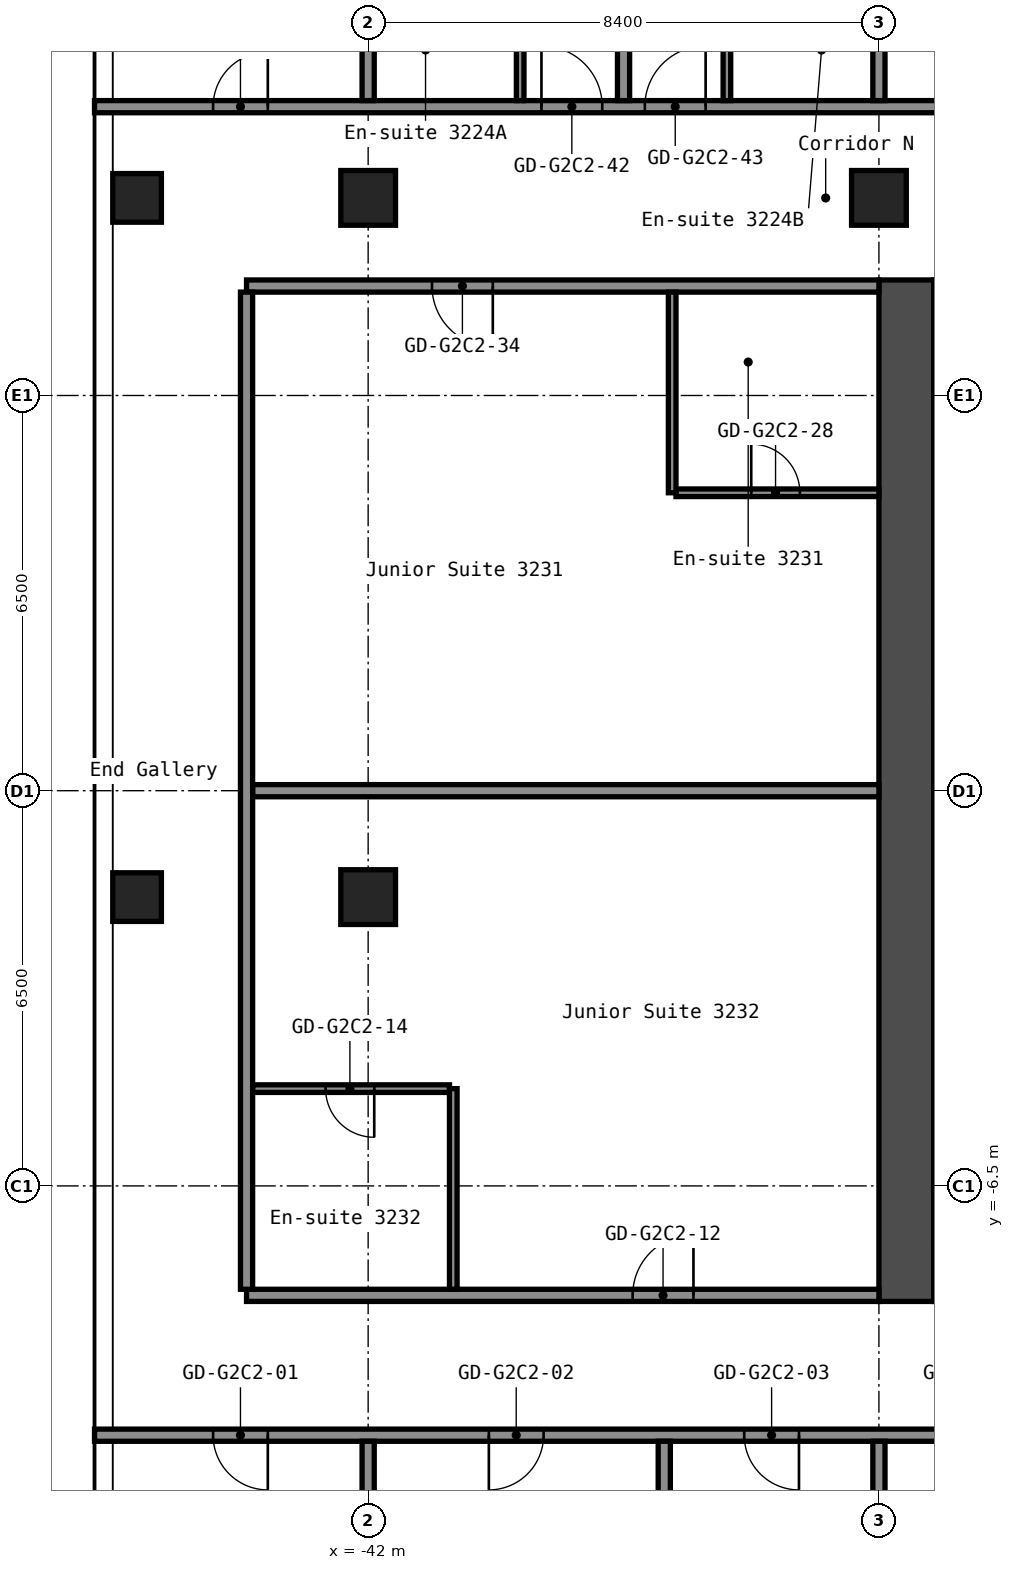
"""IFC4 building model, lengths in metres.
Left out: names, types, materials, properties, quantities, classifications, styles, units other than length and angle.
Written with IfcOpenShell. Run it as: python <this file> out.ifc"""

import sys

from ifc_helpers import new_model, si_unit, direction, frame, frame_2d, origin, origin_2d, place, context, subcontext, project, spatial, rectangle, hollow_rectangle, extrude, element, fill, save


model = new_model("IFC4")
c1 = context("Model", 3, precision=1e-05, world=origin(), true_north=direction((0.0, 1.0)))
c2 = subcontext(c1, "Body", "Model", "MODEL_VIEW")
j1 = project(units=[si_unit("LENGTHUNIT", "METRE"), si_unit("PLANEANGLEUNIT", "RADIAN")], contexts=[c1])
p1 = place(None, origin())
s1 = spatial("IfcSite", under=j1, at=p1, CompositionType="ELEMENT")
p2 = place(p1, origin())
s2 = spatial("IfcBuilding", under=s1, at=p2, CompositionType="ELEMENT")
p3 = place(p2, frame((0.0, 0.0, 113.8)))
s3 = spatial("IfcBuildingStorey", under=s2, at=p3, CompositionType="ELEMENT", Elevation=113.8)
for number, where, z_axis, x_axis in (
    (1, (-45.8, -1.75, 0.0), (0.0, 0.0, 1.0), (1.0, 0.0, 0.0)),
    (2, (-45.8, 9.75, 0.0), (0.0, 0.0, 1.0), (1.0, 0.0, 0.0)),
):
    element("IfcColumn", number, at=place(p3, frame(where, z_axis=z_axis, x_axis=x_axis)), inside=s3, PredefinedType="COLUMN", context=c2, shape_type="SweptSolid", body=[
        extrude(hollow_rectangle(XDim=0.8, YDim=0.8, WallThickness=0.032, at=origin_2d()), origin(), (0.0, 0.0, 1.0), 2.8),
    ])
for number, where, z_axis, x_axis in (
    (3, (-42.0, -1.75, 0.0), (0.0, 0.0, 1.0), (1.0, 0.0, 0.0)),
    (4, (-42.0, 9.75, 0.0), (0.0, 0.0, 1.0), (1.0, 0.0, 0.0)),
    (5, (-33.6, 9.75, 0.0), (0.0, 0.0, 1.0), (1.0, 0.0, 0.0)),
):
    element("IfcColumn", number, at=place(p3, frame(where, z_axis=z_axis, x_axis=x_axis)), inside=s3, PredefinedType="COLUMN", context=c2, shape_type="SweptSolid", body=[
        extrude(hollow_rectangle(XDim=0.9, YDim=0.9, WallThickness=0.036, at=origin_2d()), origin(), (0.0, 0.0, 1.0), 2.8),
    ])
p4 = place(p3, frame((-33.15, -8.4, 0.0), z_axis=(0.0, 0.0, 1.0), x_axis=(0.0, 1.0, 0.0)))
e6 = element("IfcWall", 6, at=p4, inside=s3, PredefinedType="SHEAR", context=c2, shape_type="SweptSolid", body=[
    extrude(rectangle(XDim=16.8, YDim=0.9, at=frame_2d((8.4, 0.0))), origin(), (0.0, 0.0, 1.0), 2.8),
])
p5 = place(p3, frame((-32.7, 1.325, 0.0), z_axis=(0.0, 0.0, 1.0), x_axis=(1.0, 0.0, 0.0)))
e7 = element("IfcWall", 7, at=p5, inside=s3, PredefinedType="SHEAR", context=c2, shape_type="SweptSolid", body=[
    extrude(rectangle(XDim=5.05, YDim=0.25, at=frame_2d((2.525, 0.0))), origin(), (0.0, 0.0, 1.0), 2.8),
])
p6 = place(p5, frame((3.3, 0.0, 0.0)))
e8 = element("IfcOpeningElement", 8, at=p6, cuts=e7, PredefinedType="OPENING", context=c2, shape_type="SweptSolid", body=[
    extrude(rectangle(XDim=1.2, YDim=2.1, at=frame_2d((0.6, 1.05))), frame((0.0, 0.135, 0.0), z_axis=(0.0, -1.0, 0.0), x_axis=(1.0, 0.0, 0.0)), (0.0, 0.0, 1.0), 0.27),
])
p7 = place(p3, frame((-32.7, -3.625, 0.0), z_axis=(0.0, 0.0, 1.0), x_axis=(1.0, 0.0, 0.0)))
e9 = element("IfcWall", 9, at=p7, inside=s3, PredefinedType="SHEAR", context=c2, shape_type="SweptSolid", body=[
    extrude(rectangle(XDim=4.55, YDim=0.25, at=frame_2d((2.275, 0.0))), origin(), (0.0, 0.0, 1.0), 2.8),
])
p8 = place(p7, frame((2.85, 0.0, 0.0)))
e10 = element("IfcOpeningElement", 10, at=p8, cuts=e9, PredefinedType="OPENING", context=c2, shape_type="SweptSolid", body=[
    extrude(rectangle(XDim=1.1, YDim=2.1, at=frame_2d((0.55, 1.05))), frame((0.0, 0.135, 0.0), z_axis=(0.0, -1.0, 0.0), x_axis=(1.0, 0.0, 0.0)), (0.0, 0.0, 1.0), 0.27),
])
p9 = place(p7, frame((0.6, 0.0, 0.0)))
e11 = element("IfcOpeningElement", 11, at=p9, cuts=e9, PredefinedType="OPENING", context=c2, shape_type="SweptSolid", body=[
    extrude(rectangle(XDim=1.1, YDim=2.1, at=frame_2d((0.55, 1.05))), frame((0.0, 0.135, 0.0), z_axis=(0.0, -1.0, 0.0), x_axis=(1.0, 0.0, 0.0)), (0.0, 0.0, 1.0), 0.27),
])
p10 = place(p3, frame((-32.7, -6.75, 0.0), z_axis=(0.0, 0.0, 1.0), x_axis=(1.0, 0.0, 0.0)))
e12 = element("IfcWall", 12, at=p10, inside=s3, PredefinedType="SHEAR", context=c2, shape_type="SweptSolid", body=[
    extrude(rectangle(XDim=4.55, YDim=1.5, at=frame_2d((2.275, 0.0))), origin(), (0.0, 0.0, 1.0), 2.8),
])
p11 = place(p3, frame((-32.7, -0.875, 0.0), z_axis=(0.0, 0.0, 1.0), x_axis=(1.0, 0.0, 0.0)))
e13 = element("IfcWall", 13, at=p11, inside=s3, PredefinedType="PARTITIONING", context=c2, shape_type="SweptSolid", body=[
    extrude(rectangle(XDim=2.3, YDim=0.15, at=frame_2d((1.15, 0.0))), origin(), (0.0, 0.0, 1.0), 2.8),
])
p12 = place(p3, frame((-46.5, -10.6, 0.0), z_axis=(0.0, 0.0, 1.0), x_axis=(1.0, 0.0, 0.0)))
e14 = element("IfcWall", 14, at=p12, inside=s3, PredefinedType="PARTITIONING", context=c2, shape_type="SweptSolid", body=[
    extrude(rectangle(XDim=29.7, YDim=0.2, at=frame_2d((14.85, 0.0))), origin(), (0.0, 0.0, 1.0), 2.8),
])
p13 = place(p12, frame((1.95, 0.0, 0.0)))
e15 = element("IfcOpeningElement", 15, at=p13, cuts=e14, PredefinedType="OPENING", context=c2, shape_type="SweptSolid", body=[
    extrude(rectangle(XDim=0.9, YDim=2.1, at=frame_2d((0.45, 1.05))), frame((0.0, 0.11, 0.0), z_axis=(0.0, -1.0, 0.0), x_axis=(1.0, 0.0, 0.0)), (0.0, 0.0, 1.0), 0.22),
])
p14 = place(p12, frame((6.485, 0.0, 0.0)))
e16 = element("IfcOpeningElement", 16, at=p14, cuts=e14, PredefinedType="OPENING", context=c2, shape_type="SweptSolid", body=[
    extrude(rectangle(XDim=0.9, YDim=2.1, at=frame_2d((0.45, 1.05))), frame((0.0, 0.11, 0.0), z_axis=(0.0, -1.0, 0.0), x_axis=(1.0, 0.0, 0.0)), (0.0, 0.0, 1.0), 0.22),
])
p15 = place(p12, frame((10.685, 0.0, 0.0)))
e17 = element("IfcOpeningElement", 17, at=p15, cuts=e14, PredefinedType="OPENING", context=c2, shape_type="SweptSolid", body=[
    extrude(rectangle(XDim=0.9, YDim=2.1, at=frame_2d((0.45, 1.05))), frame((0.0, 0.11, 0.0), z_axis=(0.0, -1.0, 0.0), x_axis=(1.0, 0.0, 0.0)), (0.0, 0.0, 1.0), 0.22),
])
p16 = place(p12, frame((14.13, 0.0, 0.0)))
e18 = element("IfcOpeningElement", 18, at=p16, cuts=e14, PredefinedType="OPENING", context=c2, shape_type="SweptSolid", body=[
    extrude(rectangle(XDim=0.9, YDim=2.1, at=frame_2d((0.45, 1.05))), frame((0.0, 0.11, 0.0), z_axis=(0.0, -1.0, 0.0), x_axis=(1.0, 0.0, 0.0)), (0.0, 0.0, 1.0), 0.22),
])
p17 = place(p12, frame((18.33, 0.0, 0.0)))
e19 = element("IfcOpeningElement", 19, at=p17, cuts=e14, PredefinedType="OPENING", context=c2, shape_type="SweptSolid", body=[
    extrude(rectangle(XDim=0.9, YDim=2.1, at=frame_2d((0.45, 1.05))), frame((0.0, 0.11, 0.0), z_axis=(0.0, -1.0, 0.0), x_axis=(1.0, 0.0, 0.0)), (0.0, 0.0, 1.0), 0.22),
])
p18 = place(p12, frame((25.0, 0.0, 0.0)))
e20 = element("IfcOpeningElement", 20, at=p18, cuts=e14, PredefinedType="OPENING", context=c2, shape_type="SweptSolid", body=[
    extrude(rectangle(XDim=1.0, YDim=2.1, at=frame_2d((0.5, 1.05))), frame((0.0, 0.11, 0.0), z_axis=(0.0, -1.0, 0.0), x_axis=(1.0, 0.0, 0.0)), (0.0, 0.0, 1.0), 0.22),
])
p19 = place(p3, frame((-44.0, -8.3, 0.0), z_axis=(0.0, 0.0, 1.0), x_axis=(1.0, 0.0, 0.0)))
e21 = element("IfcWall", 21, at=p19, inside=s3, PredefinedType="PARTITIONING", context=c2, shape_type="SweptSolid", body=[
    extrude(rectangle(XDim=10.4, YDim=0.2, at=frame_2d((5.2, 0.0))), origin(), (0.0, 0.0, 1.0), 2.8),
])
p20 = place(p19, frame((6.35, 0.0, 0.0)))
e22 = element("IfcOpeningElement", 22, at=p20, cuts=e21, PredefinedType="OPENING", context=c2, shape_type="SweptSolid", body=[
    extrude(rectangle(XDim=1.0, YDim=2.1, at=frame_2d((0.5, 1.05))), frame((0.0, 0.11, 0.0), z_axis=(0.0, -1.0, 0.0), x_axis=(1.0, 0.0, 0.0)), (0.0, 0.0, 1.0), 0.22),
])
p21 = place(p3, frame((-43.9, -4.9, 0.0), z_axis=(0.0, 0.0, 1.0), x_axis=(1.0, 0.0, 0.0)))
e23 = element("IfcWall", 23, at=p21, inside=s3, PredefinedType="PARTITIONING", context=c2, shape_type="SweptSolid", body=[
    extrude(rectangle(XDim=3.237, YDim=0.125, at=frame_2d((1.619, 0.0))), origin(), (0.0, 0.0, 1.0), 2.8),
])
p22 = place(p21, frame((1.2, 0.0, 0.0)))
e24 = element("IfcOpeningElement", 24, at=p22, cuts=e23, PredefinedType="OPENING", context=c2, shape_type="SweptSolid", body=[
    extrude(rectangle(XDim=0.8, YDim=2.1, at=frame_2d((0.4, 1.05))), frame((0.0, 0.073, 0.0), z_axis=(0.0, -1.0, 0.0), x_axis=(1.0, 0.0, 0.0)), (0.0, 0.0, 1.0), 0.145),
])
p23 = place(p3, frame((-43.9, 0.0, 0.0), z_axis=(0.0, 0.0, 1.0), x_axis=(1.0, 0.0, 0.0)))
e25 = element("IfcWall", 25, at=p23, inside=s3, PredefinedType="PARTITIONING", context=c2, shape_type="SweptSolid", body=[
    extrude(rectangle(XDim=10.3, YDim=0.2, at=frame_2d((5.15, 0.0))), origin(), (0.0, 0.0, 1.0), 2.8),
])
p24 = place(p3, frame((-36.938, 4.9, 0.0), z_axis=(0.0, 0.0, 1.0), x_axis=(1.0, 0.0, 0.0)))
e26 = element("IfcWall", 26, at=p24, inside=s3, PredefinedType="PARTITIONING", context=c2, shape_type="SweptSolid", body=[
    extrude(rectangle(XDim=3.337, YDim=0.125, at=frame_2d((1.669, 0.0))), origin(), (0.0, 0.0, 1.0), 2.8),
])
p25 = place(p24, frame((1.238, 0.0, 0.0)))
e27 = element("IfcOpeningElement", 27, at=p25, cuts=e26, PredefinedType="OPENING", context=c2, shape_type="SweptSolid", body=[
    extrude(rectangle(XDim=0.8, YDim=2.1, at=frame_2d((0.4, 1.05))), frame((0.0, 0.073, 0.0), z_axis=(0.0, -1.0, 0.0), x_axis=(1.0, 0.0, 0.0)), (0.0, 0.0, 1.0), 0.145),
])
p26 = place(p3, frame((-44.0, 8.3, 0.0), z_axis=(0.0, 0.0, 1.0), x_axis=(1.0, 0.0, 0.0)))
e28 = element("IfcWall", 28, at=p26, inside=s3, PredefinedType="PARTITIONING", context=c2, shape_type="SweptSolid", body=[
    extrude(rectangle(XDim=10.4, YDim=0.2, at=frame_2d((5.2, 0.0))), origin(), (0.0, 0.0, 1.0), 2.8),
])
p27 = place(p26, frame((3.05, 0.0, 0.0)))
e29 = element("IfcOpeningElement", 29, at=p27, cuts=e28, PredefinedType="OPENING", context=c2, shape_type="SweptSolid", body=[
    extrude(rectangle(XDim=1.0, YDim=2.1, at=frame_2d((0.5, 1.05))), frame((0.0, 0.11, 0.0), z_axis=(0.0, -1.0, 0.0), x_axis=(1.0, 0.0, 0.0)), (0.0, 0.0, 1.0), 0.22),
])
p28 = place(p3, frame((-46.5, 11.25, 0.0), z_axis=(0.0, 0.0, 1.0), x_axis=(1.0, 0.0, 0.0)))
e30 = element("IfcWall", 30, at=p28, inside=s3, PredefinedType="PARTITIONING", context=c2, shape_type="SweptSolid", body=[
    extrude(rectangle(XDim=29.7, YDim=0.2, at=frame_2d((14.85, 0.0))), origin(), (0.0, 0.0, 1.0), 2.8),
])
p29 = place(p28, frame((1.95, 0.0, 0.0)))
e31 = element("IfcOpeningElement", 31, at=p29, cuts=e30, PredefinedType="OPENING", context=c2, shape_type="SweptSolid", body=[
    extrude(rectangle(XDim=0.9, YDim=2.1, at=frame_2d((0.45, 1.05))), frame((0.0, 0.11, 0.0), z_axis=(0.0, -1.0, 0.0), x_axis=(1.0, 0.0, 0.0)), (0.0, 0.0, 1.0), 0.22),
])
p30 = place(p28, frame((7.35, 0.0, 0.0)))
e32 = element("IfcOpeningElement", 32, at=p30, cuts=e30, PredefinedType="OPENING", context=c2, shape_type="SweptSolid", body=[
    extrude(rectangle(XDim=1.0, YDim=2.1, at=frame_2d((0.5, 1.05))), frame((0.0, 0.11, 0.0), z_axis=(0.0, -1.0, 0.0), x_axis=(1.0, 0.0, 0.0)), (0.0, 0.0, 1.0), 0.22),
])
p31 = place(p28, frame((9.05, 0.0, 0.0)))
e33 = element("IfcOpeningElement", 33, at=p31, cuts=e30, PredefinedType="OPENING", context=c2, shape_type="SweptSolid", body=[
    extrude(rectangle(XDim=1.0, YDim=2.1, at=frame_2d((0.5, 1.05))), frame((0.0, 0.11, 0.0), z_axis=(0.0, -1.0, 0.0), x_axis=(1.0, 0.0, 0.0)), (0.0, 0.0, 1.0), 0.22),
])
p32 = place(p28, frame((18.3, 0.0, 0.0)))
e34 = element("IfcOpeningElement", 34, at=p32, cuts=e30, PredefinedType="OPENING", context=c2, shape_type="SweptSolid", body=[
    extrude(rectangle(XDim=1.0, YDim=2.1, at=frame_2d((0.5, 1.05))), frame((0.0, 0.11, 0.0), z_axis=(0.0, -1.0, 0.0), x_axis=(1.0, 0.0, 0.0)), (0.0, 0.0, 1.0), 0.22),
])
p33 = place(p28, frame((24.15, 0.0, 0.0)))
e35 = element("IfcOpeningElement", 35, at=p33, cuts=e30, PredefinedType="OPENING", context=c2, shape_type="SweptSolid", body=[
    extrude(rectangle(XDim=1.0, YDim=2.1, at=frame_2d((0.5, 1.05))), frame((0.0, 0.11, 0.0), z_axis=(0.0, -1.0, 0.0), x_axis=(1.0, 0.0, 0.0)), (0.0, 0.0, 1.0), 0.22),
])
p34 = place(p28, frame((25.85, 0.0, 0.0)))
e36 = element("IfcOpeningElement", 36, at=p34, cuts=e30, PredefinedType="OPENING", context=c2, shape_type="SweptSolid", body=[
    extrude(rectangle(XDim=1.0, YDim=2.1, at=frame_2d((0.5, 1.05))), frame((0.0, 0.11, 0.0), z_axis=(0.0, -1.0, 0.0), x_axis=(1.0, 0.0, 0.0)), (0.0, 0.0, 1.0), 0.22),
])
p35 = place(p3, frame((-44.0, -8.2, 0.0), z_axis=(0.0, 0.0, 1.0), x_axis=(0.0, 1.0, 0.0)))
e37 = element("IfcWall", 37, at=p35, inside=s3, PredefinedType="PARTITIONING", context=c2, shape_type="SweptSolid", body=[
    extrude(rectangle(XDim=16.4, YDim=0.2, at=frame_2d((8.2, 0.0))), origin(), (0.0, 0.0, 1.0), 2.8),
])
p36 = place(p3, frame((-42.0, -15.55, 0.0), z_axis=(0.0, 0.0, 1.0), x_axis=(0.0, 1.0, 0.0)))
e38 = element("IfcWall", 38, at=p36, inside=s3, PredefinedType="PARTITIONING", context=c2, shape_type="SweptSolid", body=[
    extrude(rectangle(XDim=4.85, YDim=0.2, at=frame_2d((2.425, 0.0))), origin(), (0.0, 0.0, 1.0), 2.8),
])
p37 = place(p3, frame((-42.0, 11.35, 0.0), z_axis=(0.0, 0.0, 1.0), x_axis=(0.0, 1.0, 0.0)))
e39 = element("IfcWall", 39, at=p37, inside=s3, PredefinedType="PARTITIONING", context=c2, shape_type="SweptSolid", body=[
    extrude(rectangle(XDim=12.2, YDim=0.2, at=frame_2d((6.1, 0.0))), origin(), (0.0, 0.0, 1.0), 2.8),
])
p38 = place(p3, frame((-40.6, -8.2, 0.0), z_axis=(0.0, 0.0, 1.0), x_axis=(0.0, 1.0, 0.0)))
e40 = element("IfcWall", 40, at=p38, inside=s3, PredefinedType="PARTITIONING", context=c2, shape_type="SweptSolid", body=[
    extrude(rectangle(XDim=3.3, YDim=0.125, at=frame_2d((1.65, 0.0))), origin(), (0.0, 0.0, 1.0), 2.8),
])
p39 = place(p3, frame((-39.5, 11.35, 0.0), z_axis=(0.0, 0.0, 1.0), x_axis=(0.0, 1.0, 0.0)))
e41 = element("IfcWall", 41, at=p39, inside=s3, PredefinedType="PARTITIONING", context=c2, shape_type="SweptSolid", body=[
    extrude(rectangle(XDim=2.9, YDim=0.125, at=frame_2d((1.45, 0.0))), origin(), (0.0, 0.0, 1.0), 2.8),
])
p40 = place(p39, frame((1.5, 0.0, 0.0)))
e42 = element("IfcOpeningElement", 42, at=p40, cuts=e41, PredefinedType="OPENING", context=c2, shape_type="SweptSolid", body=[
    extrude(rectangle(XDim=0.8, YDim=2.1, at=frame_2d((0.4, 1.05))), frame((0.0, 0.073, 0.0), z_axis=(0.0, -1.0, 0.0), x_axis=(1.0, 0.0, 0.0)), (0.0, 0.0, 1.0), 0.145),
])
p41 = place(p3, frame((-37.8, 11.35, 0.0), z_axis=(0.0, 0.0, 1.0), x_axis=(0.0, 1.0, 0.0)))
e43 = element("IfcWall", 43, at=p41, inside=s3, PredefinedType="PARTITIONING", context=c2, shape_type="SweptSolid", body=[
    extrude(rectangle(XDim=12.2, YDim=0.2, at=frame_2d((6.1, 0.0))), origin(), (0.0, 0.0, 1.0), 2.8),
])
p42 = place(p3, frame((-37.13, -15.55, 0.0), z_axis=(0.0, 0.0, 1.0), x_axis=(0.0, 1.0, 0.0)))
e44 = element("IfcWall", 44, at=p42, inside=s3, PredefinedType="PARTITIONING", context=c2, shape_type="SweptSolid", body=[
    extrude(rectangle(XDim=4.85, YDim=0.2, at=frame_2d((2.425, 0.0))), origin(), (0.0, 0.0, 1.0), 2.8),
])
p43 = place(p3, frame((-37.0, 4.9, 0.0), z_axis=(0.0, 0.0, 1.0), x_axis=(0.0, 1.0, 0.0)))
e45 = element("IfcWall", 45, at=p43, inside=s3, PredefinedType="PARTITIONING", context=c2, shape_type="SweptSolid", body=[
    extrude(rectangle(XDim=3.3, YDim=0.125, at=frame_2d((1.65, 0.0))), origin(), (0.0, 0.0, 1.0), 2.8),
])
p44 = place(p3, frame((-36.1, 11.35, 0.0), z_axis=(0.0, 0.0, 1.0), x_axis=(0.0, 1.0, 0.0)))
e46 = element("IfcWall", 46, at=p44, inside=s3, PredefinedType="PARTITIONING", context=c2, shape_type="SweptSolid", body=[
    extrude(rectangle(XDim=2.9, YDim=0.125, at=frame_2d((1.45, 0.0))), origin(), (0.0, 0.0, 1.0), 2.8),
])
p45 = place(p44, frame((1.5, 0.0, 0.0)))
e47 = element("IfcOpeningElement", 47, at=p45, cuts=e46, PredefinedType="OPENING", context=c2, shape_type="SweptSolid", body=[
    extrude(rectangle(XDim=0.8, YDim=2.1, at=frame_2d((0.4, 1.05))), frame((0.0, 0.073, 0.0), z_axis=(0.0, -1.0, 0.0), x_axis=(1.0, 0.0, 0.0)), (0.0, 0.0, 1.0), 0.145),
])
p46 = place(p3, frame((-33.6, -15.55, 0.0), z_axis=(0.0, 0.0, 1.0), x_axis=(0.0, 1.0, 0.0)))
e48 = element("IfcWall", 48, at=p46, inside=s3, PredefinedType="PARTITIONING", context=c2, shape_type="SweptSolid", body=[
    extrude(rectangle(XDim=4.85, YDim=0.2, at=frame_2d((2.425, 0.0))), origin(), (0.0, 0.0, 1.0), 2.8),
])
p47 = place(p3, frame((-33.6, 11.35, 0.0), z_axis=(0.0, 0.0, 1.0), x_axis=(0.0, 1.0, 0.0)))
e49 = element("IfcWall", 49, at=p47, inside=s3, PredefinedType="PARTITIONING", context=c2, shape_type="SweptSolid", body=[
    extrude(rectangle(XDim=12.2, YDim=0.2, at=frame_2d((6.1, 0.0))), origin(), (0.0, 0.0, 1.0), 2.8),
])
p48 = place(p13, origin())
e50 = element("IfcDoor", 50, at=p48, inside=s3, OperationType="SINGLE_SWING_RIGHT", PredefinedType="DOOR", context=c2, shape_type="SweptSolid", body=[
    extrude(rectangle(XDim=0.9, YDim=2.1, at=frame_2d((0.45, 1.05))), frame((0.0, 0.025, 0.0), z_axis=(0.0, -1.0, 0.0), x_axis=(1.0, 0.0, 0.0)), (0.0, 0.0, 1.0), 0.05),
])
fill(e15, e50)
p49 = place(p14, origin())
e51 = element("IfcDoor", 51, at=p49, inside=s3, OperationType="SINGLE_SWING_LEFT", PredefinedType="DOOR", context=c2, shape_type="SweptSolid", body=[
    extrude(rectangle(XDim=0.9, YDim=2.1, at=frame_2d((0.45, 1.05))), frame((0.0, 0.025, 0.0), z_axis=(0.0, -1.0, 0.0), x_axis=(1.0, 0.0, 0.0)), (0.0, 0.0, 1.0), 0.05),
])
fill(e16, e51)
p50 = place(p15, origin())
e52 = element("IfcDoor", 52, at=p50, inside=s3, OperationType="SINGLE_SWING_RIGHT", PredefinedType="DOOR", context=c2, shape_type="SweptSolid", body=[
    extrude(rectangle(XDim=0.9, YDim=2.1, at=frame_2d((0.45, 1.05))), frame((0.0, 0.025, 0.0), z_axis=(0.0, -1.0, 0.0), x_axis=(1.0, 0.0, 0.0)), (0.0, 0.0, 1.0), 0.05),
])
fill(e17, e52)
p51 = place(p20, origin())
e53 = element("IfcDoor", 53, at=p51, inside=s3, OperationType="SINGLE_SWING_LEFT", PredefinedType="DOOR", context=c2, shape_type="SweptSolid", body=[
    extrude(rectangle(XDim=1.0, YDim=2.1, at=frame_2d((0.5, 1.05))), frame((0.0, 0.025, 0.0), z_axis=(0.0, -1.0, 0.0), x_axis=(1.0, 0.0, 0.0)), (0.0, 0.0, 1.0), 0.05),
])
fill(e22, e53)
p52 = place(p22, origin())
e54 = element("IfcDoor", 54, at=p52, inside=s3, OperationType="SINGLE_SWING_RIGHT", PredefinedType="DOOR", context=c2, shape_type="SweptSolid", body=[
    extrude(rectangle(XDim=0.8, YDim=2.1, at=frame_2d((0.4, 1.05))), frame((0.0, 0.025, 0.0), z_axis=(0.0, -1.0, 0.0), x_axis=(1.0, 0.0, 0.0)), (0.0, 0.0, 1.0), 0.05),
])
fill(e24, e54)
p53 = place(p25, origin())
e55 = element("IfcDoor", 55, at=p53, inside=s3, OperationType="SINGLE_SWING_RIGHT", PredefinedType="DOOR", context=c2, shape_type="SweptSolid", body=[
    extrude(rectangle(XDim=0.8, YDim=2.1, at=frame_2d((0.4, 1.05))), frame((0.0, 0.025, 0.0), z_axis=(0.0, -1.0, 0.0), x_axis=(1.0, 0.0, 0.0)), (0.0, 0.0, 1.0), 0.05),
])
fill(e27, e55)
p54 = place(p27, origin())
e56 = element("IfcDoor", 56, at=p54, inside=s3, OperationType="SINGLE_SWING_RIGHT", PredefinedType="DOOR", context=c2, shape_type="SweptSolid", body=[
    extrude(rectangle(XDim=1.0, YDim=2.1, at=frame_2d((0.5, 1.05))), frame((0.0, 0.025, 0.0), z_axis=(0.0, -1.0, 0.0), x_axis=(1.0, 0.0, 0.0)), (0.0, 0.0, 1.0), 0.05),
])
fill(e29, e56)
p55 = place(p29, origin())
e57 = element("IfcDoor", 57, at=p55, inside=s3, OperationType="SINGLE_SWING_LEFT", PredefinedType="DOOR", context=c2, shape_type="SweptSolid", body=[
    extrude(rectangle(XDim=0.9, YDim=2.1, at=frame_2d((0.45, 1.05))), frame((0.0, 0.025, 0.0), z_axis=(0.0, -1.0, 0.0), x_axis=(1.0, 0.0, 0.0)), (0.0, 0.0, 1.0), 0.05),
])
fill(e31, e57)
p56 = place(p30, origin())
e58 = element("IfcDoor", 58, at=p56, inside=s3, OperationType="SINGLE_SWING_RIGHT", PredefinedType="DOOR", context=c2, shape_type="SweptSolid", body=[
    extrude(rectangle(XDim=1.0, YDim=2.1, at=frame_2d((0.5, 1.05))), frame((0.0, 0.025, 0.0), z_axis=(0.0, -1.0, 0.0), x_axis=(1.0, 0.0, 0.0)), (0.0, 0.0, 1.0), 0.05),
])
fill(e32, e58)
p57 = place(p31, origin())
e59 = element("IfcDoor", 59, at=p57, inside=s3, OperationType="SINGLE_SWING_LEFT", PredefinedType="DOOR", context=c2, shape_type="SweptSolid", body=[
    extrude(rectangle(XDim=1.0, YDim=2.1, at=frame_2d((0.5, 1.05))), frame((0.0, 0.025, 0.0), z_axis=(0.0, -1.0, 0.0), x_axis=(1.0, 0.0, 0.0)), (0.0, 0.0, 1.0), 0.05),
])
fill(e33, e59)
save(model, sys.argv[1])
